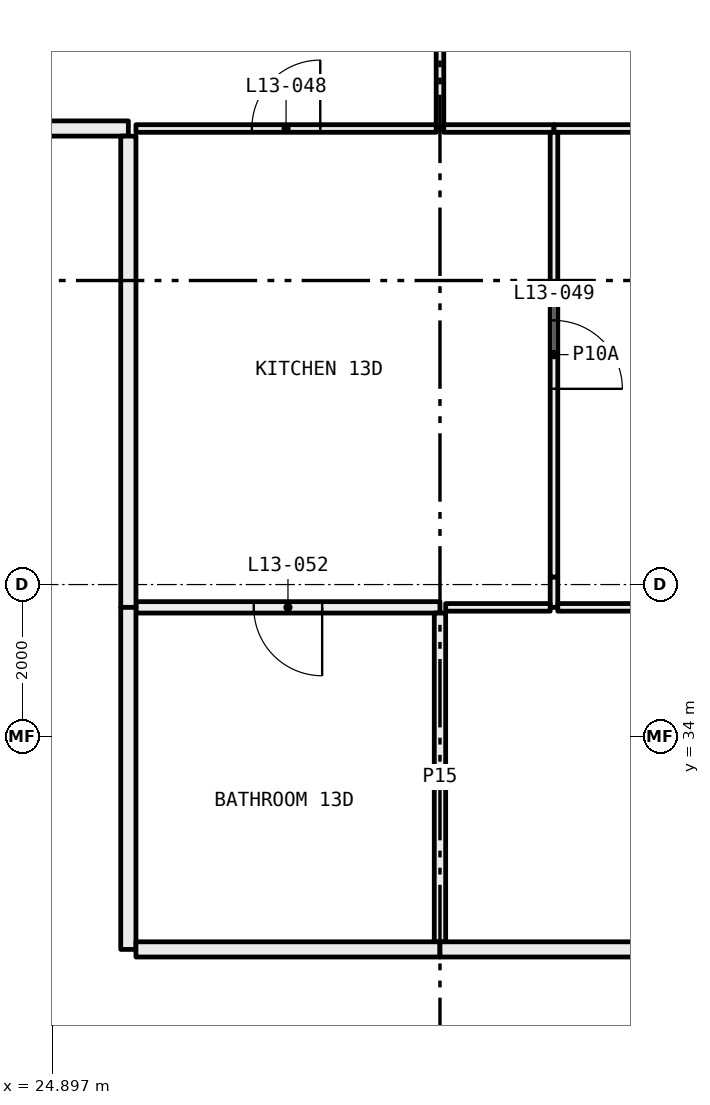
"""IFC4 building model, lengths in metres.
Left out: names, types, materials, properties, quantities, classifications, styles, units other than length and angle.
Written with IfcOpenShell. Run it as: python <this file> out.ifc"""

import sys

from ifc_helpers import new_model, si_unit, direction, frame, frame_2d, origin, place, context, subcontext, project, spatial, rectangle, extrude, element, fill, save


model = new_model("IFC4")
c1 = context("Model", 3, precision=1e-05, world=origin(), true_north=direction((0.0, 1.0)))
c2 = subcontext(c1, "Body", "Model", "MODEL_VIEW")
j1 = project(units=[si_unit("LENGTHUNIT", "METRE"), si_unit("PLANEANGLEUNIT", "RADIAN")], contexts=[c1])
p1 = place(None, origin())
s1 = spatial("IfcSite", under=j1, at=p1, CompositionType="ELEMENT")
p2 = place(p1, origin())
s2 = spatial("IfcBuilding", under=s1, at=p2, CompositionType="ELEMENT")
p3 = place(p2, frame((0.0, 0.0, 57.6)))
s3 = spatial("IfcBuildingStorey", under=s2, at=p3, CompositionType="ELEMENT", Elevation=57.6)
p4 = place(p3, frame((30.0, 42.0, 0.0), z_axis=(0.0, 0.0, 1.0), x_axis=(0.0, 1.0, 0.0)))
e1 = element("IfcWall", 1, at=p4, inside=s3, PredefinedType="PARTITIONING", context=c2, shape_type="SweptSolid", body=[
    extrude(rectangle(XDim=5.28, YDim=0.1, at=frame_2d((2.64, 0.0))), origin(), (0.0, 0.0, 1.0), 3.05),
])
p5 = place(p4, frame((2.19, 0.0, 0.0)))
e2 = element("IfcOpeningElement", 2, at=p5, cuts=e1, PredefinedType="OPENING", context=c2, shape_type="SweptSolid", body=[
    extrude(rectangle(XDim=0.9, YDim=2.1, at=frame_2d((0.45, 1.05))), frame((0.0, 0.06, 0.0), z_axis=(0.0, -1.0, 0.0), x_axis=(1.0, 0.0, 0.0)), (0.0, 0.0, 1.0), 0.12),
])
p6 = place(p3, frame((26.0, 42.0, 0.0), z_axis=(0.0, 0.0, 1.0), x_axis=(1.0, 0.0, 0.0)))
e3 = element("IfcWall", 3, at=p6, inside=s3, PredefinedType="PARTITIONING", context=c2, shape_type="SweptSolid", body=[
    extrude(rectangle(XDim=3.95, YDim=0.1, at=frame_2d((1.975, 0.0))), origin(), (0.0, 0.0, 1.0), 3.05),
])
p7 = place(p6, frame((1.525, 0.0, 0.0)))
e4 = element("IfcOpeningElement", 4, at=p7, cuts=e3, PredefinedType="OPENING", context=c2, shape_type="SweptSolid", body=[
    extrude(rectangle(XDim=0.9, YDim=2.1, at=frame_2d((0.45, 1.05))), frame((0.0, 0.06, 0.0), z_axis=(0.0, -1.0, 0.0), x_axis=(1.0, 0.0, 0.0)), (0.0, 0.0, 1.0), 0.12),
])
p8 = place(p3, frame((24.0, 42.0, 0.0), z_axis=(0.0, 0.0, 1.0), x_axis=(1.0, 0.0, 0.0)))
e5 = element("IfcWall", 5, at=p8, inside=s3, PredefinedType="PARTITIONING", context=c2, shape_type="SweptSolid", body=[
    extrude(rectangle(XDim=1.9, YDim=0.2, at=frame_2d((0.95, 0.0))), origin(), (0.0, 0.0, 1.0), 3.05),
])
p9 = place(p3, frame((30.05, 42.0, 0.0), z_axis=(0.0, 0.0, 1.0), x_axis=(1.0, 0.0, 0.0)))
e6 = element("IfcWall", 6, at=p9, inside=s3, PredefinedType="PARTITIONING", context=c2, shape_type="SweptSolid", body=[
    extrude(rectangle(XDim=1.45, YDim=0.1, at=frame_2d((0.725, 0.0))), origin(), (0.0, 0.0, 1.0), 3.05),
])
p10 = place(p3, frame((31.5, 42.0, 0.0), z_axis=(0.0, 0.0, 1.0), x_axis=(1.0, 0.0, 0.0)))
e7 = element("IfcWall", 7, at=p10, inside=s3, PredefinedType="PARTITIONING", context=c2, shape_type="SweptSolid", body=[
    extrude(rectangle(XDim=4.425, YDim=0.1, at=frame_2d((2.212, 0.0))), origin(), (0.0, 0.0, 1.0), 2.45),
])
p11 = place(p3, frame((31.5, 35.7, 0.0), z_axis=(0.0, 0.0, 1.0), x_axis=(0.0, 1.0, 0.0)))
e8 = element("IfcWall", 8, at=p11, inside=s3, PredefinedType="PARTITIONING", context=c2, shape_type="SweptSolid", body=[
    extrude(rectangle(XDim=0.4, YDim=0.1, at=frame_2d((0.2, 0.0))), origin(), (0.0, 0.0, 1.0), 2.45),
])
p12 = place(p3, frame((31.5, 36.1, 0.0), z_axis=(0.0, 0.0, 1.0), x_axis=(0.0, 1.0, 0.0)))
e9 = element("IfcWall", 9, at=p12, inside=s3, PredefinedType="PARTITIONING", context=c2, shape_type="SweptSolid", body=[
    extrude(rectangle(XDim=5.85, YDim=0.1, at=frame_2d((2.925, 0.0))), origin(), (0.0, 0.0, 1.0), 3.05),
])
p13 = place(p12, frame((2.475, 0.0, 0.0)))
e10 = element("IfcOpeningElement", 10, at=p13, cuts=e9, PredefinedType="OPENING", context=c2, shape_type="SweptSolid", body=[
    extrude(rectangle(XDim=0.9, YDim=2.1, at=frame_2d((0.45, 1.05))), frame((0.0, 0.06, 0.0), z_axis=(0.0, -1.0, 0.0), x_axis=(1.0, 0.0, 0.0)), (0.0, 0.0, 1.0), 0.12),
])
p14 = place(p3, frame((26.0, 35.7, 0.0), z_axis=(0.0, 0.0, 1.0), x_axis=(1.0, 0.0, 0.0)))
e11 = element("IfcWall", 11, at=p14, inside=s3, PredefinedType="PARTITIONING", context=c2, shape_type="SweptSolid", body=[
    extrude(rectangle(XDim=4.0, YDim=0.15, at=frame_2d((2.0, 0.0))), origin(), (0.0, 0.0, 1.0), 3.05),
])
p15 = place(p14, frame((1.55, 0.0, 0.0)))
e12 = element("IfcOpeningElement", 12, at=p15, cuts=e11, PredefinedType="OPENING", context=c2, shape_type="SweptSolid", body=[
    extrude(rectangle(XDim=0.9, YDim=2.1, at=frame_2d((0.45, 1.05))), frame((0.0, 0.085, 0.0), z_axis=(0.0, -1.0, 0.0), x_axis=(1.0, 0.0, 0.0)), (0.0, 0.0, 1.0), 0.17),
])
p16 = place(p3, frame((30.075, 35.7, 0.0), z_axis=(0.0, 0.0, 1.0), x_axis=(1.0, 0.0, 0.0)))
e13 = element("IfcWall", 13, at=p16, inside=s3, PredefinedType="PARTITIONING", context=c2, shape_type="SweptSolid", body=[
    extrude(rectangle(XDim=1.375, YDim=0.1, at=frame_2d((0.688, 0.0))), origin(), (0.0, 0.0, 1.0), 3.05),
])
p17 = place(p3, frame((25.9, 41.9, 0.0), z_axis=(0.0, 0.0, 1.0), x_axis=(0.0, -1.0, 0.0)))
e14 = element("IfcWall", 14, at=p17, inside=s3, PredefinedType="PARTITIONING", context=c2, shape_type="SweptSolid", body=[
    extrude(rectangle(XDim=6.2, YDim=0.2, at=frame_2d((3.1, 0.0))), origin(), (0.0, 0.0, 1.0), 2.45),
])
p18 = place(p3, frame((31.55, 35.7, 0.0), z_axis=(0.0, 0.0, 1.0), x_axis=(1.0, 0.0, 0.0)))
e15 = element("IfcWall", 15, at=p18, inside=s3, PredefinedType="PARTITIONING", context=c2, shape_type="SweptSolid", body=[
    extrude(rectangle(XDim=3.65, YDim=0.1, at=frame_2d((1.825, 0.0))), origin(), (0.0, 0.0, 1.0), 3.05),
])
p19 = place(p18, frame((1.375, 0.0, 0.0)))
e16 = element("IfcOpeningElement", 16, at=p19, cuts=e15, PredefinedType="OPENING", context=c2, shape_type="SweptSolid", body=[
    extrude(rectangle(XDim=0.9, YDim=2.1, at=frame_2d((0.45, 1.05))), frame((0.0, 0.06, 0.0), z_axis=(0.0, -1.0, 0.0), x_axis=(1.0, 0.0, 0.0)), (0.0, 0.0, 1.0), 0.12),
])
p20 = place(p3, frame((30.0, 31.3, 0.0), z_axis=(0.0, 0.0, 1.0), x_axis=(0.0, 1.0, 0.0)))
e17 = element("IfcWall", 17, at=p20, inside=s3, PredefinedType="PARTITIONING", context=c2, shape_type="SweptSolid", body=[
    extrude(rectangle(XDim=4.325, YDim=0.15, at=frame_2d((2.163, 0.0))), origin(), (0.0, 0.0, 1.0), 3.05),
])
p21 = place(p3, frame((25.9, 35.7, 0.0), z_axis=(0.0, 0.0, 1.0), x_axis=(0.0, -1.0, 0.0)))
e18 = element("IfcWall", 18, at=p21, inside=s3, PredefinedType="PARTITIONING", context=c2, shape_type="SweptSolid", body=[
    extrude(rectangle(XDim=4.5, YDim=0.2, at=frame_2d((2.25, 0.0))), origin(), (0.0, 0.0, 1.0), 3.05),
])
p22 = place(p3, frame((26.0, 31.2, 0.0), z_axis=(0.0, 0.0, 1.0), x_axis=(1.0, 0.0, 0.0)))
e19 = element("IfcWall", 19, at=p22, inside=s3, PredefinedType="PARTITIONING", context=c2, shape_type="SweptSolid", body=[
    extrude(rectangle(XDim=4.0, YDim=0.2, at=frame_2d((2.0, 0.0))), origin(), (0.0, 0.0, 1.0), 3.05),
])
p23 = place(p3, frame((30.0, 31.2, 0.0), z_axis=(0.0, 0.0, 1.0), x_axis=(1.0, 0.0, 0.0)))
e20 = element("IfcWall", 20, at=p23, inside=s3, PredefinedType="PARTITIONING", context=c2, shape_type="SweptSolid", body=[
    extrude(rectangle(XDim=6.1, YDim=0.2, at=frame_2d((3.05, 0.0))), origin(), (0.0, 0.0, 1.0), 2.45),
])
p24 = place(p7, origin())
e21 = element("IfcDoor", 21, at=p24, inside=s3, OperationType="SINGLE_SWING_LEFT", PredefinedType="DOOR", context=c2, shape_type="SweptSolid", body=[
    extrude(rectangle(XDim=0.9, YDim=2.1, at=frame_2d((0.45, 1.05))), frame((0.0, 0.025, 0.0), z_axis=(0.0, -1.0, 0.0), x_axis=(1.0, 0.0, 0.0)), (0.0, 0.0, 1.0), 0.05),
])
fill(e4, e21)
p25 = place(p13, frame((0.9, 0.0, 0.0), x_axis=(-1.0, 0.0, 0.0)))
e22 = element("IfcDoor", 22, at=p25, inside=s3, OperationType="SINGLE_SWING_LEFT", PredefinedType="DOOR", context=c2, shape_type="SweptSolid", body=[
    extrude(rectangle(XDim=0.9, YDim=2.1, at=frame_2d((0.45, 1.05))), frame((0.0, 0.025, 0.0), z_axis=(0.0, -1.0, 0.0), x_axis=(1.0, 0.0, 0.0)), (0.0, 0.0, 1.0), 0.05),
])
fill(e10, e22)
p26 = place(p15, frame((0.9, 0.0, 0.0), x_axis=(-1.0, 0.0, 0.0)))
e23 = element("IfcDoor", 23, at=p26, inside=s3, OperationType="SINGLE_SWING_RIGHT", PredefinedType="DOOR", context=c2, shape_type="SweptSolid", body=[
    extrude(rectangle(XDim=0.9, YDim=2.1, at=frame_2d((0.45, 1.05))), frame((0.0, 0.025, 0.0), z_axis=(0.0, -1.0, 0.0), x_axis=(1.0, 0.0, 0.0)), (0.0, 0.0, 1.0), 0.05),
])
fill(e12, e23)
save(model, sys.argv[1])
